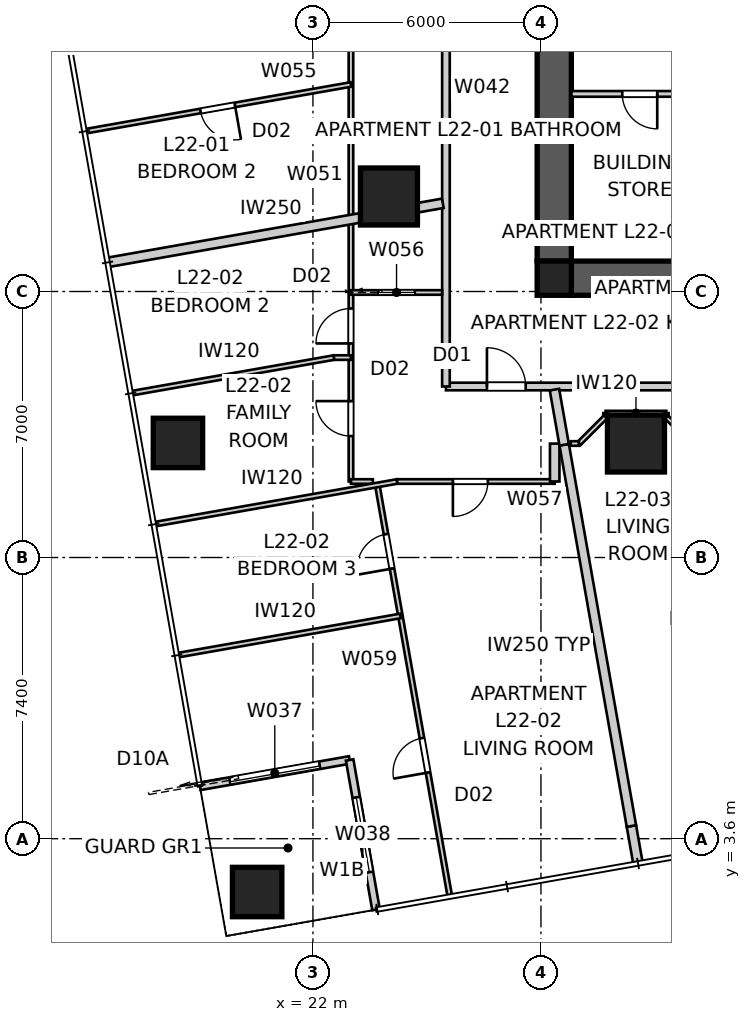
"""IFC4 building model, lengths in metres.
Left out: names, types, materials, properties, quantities, classifications, styles, units other than length and angle.
Written with IfcOpenShell. Run it as: python <this file> out.ifc"""

import sys

from ifc_helpers import new_model, si_unit, direction, frame, frame_2d, origin, origin_2d, place, context, subcontext, project, spatial, polyline, rectangle, outline, extrude, element, fill, save


model = new_model("IFC4")
c1 = context("Model", 3, precision=1e-05, world=origin(), true_north=direction((0.0, 1.0)))
c2 = subcontext(c1, "Body", "Model", "MODEL_VIEW")
j1 = project(units=[si_unit("LENGTHUNIT", "METRE"), si_unit("PLANEANGLEUNIT", "RADIAN")], contexts=[c1])
p1 = place(None, origin())
s1 = spatial("IfcSite", under=j1, at=p1, CompositionType="ELEMENT")
p2 = place(p1, origin())
s2 = spatial("IfcBuilding", under=s1, at=p2, CompositionType="ELEMENT")
p3 = place(p2, frame((0.0, 0.0, 82.8)))
s3 = spatial("IfcBuildingStorey", under=s2, at=p3, CompositionType="ELEMENT", Elevation=82.8)
p4 = place(p3, frame((51.2, 18.35, 0.0), z_axis=(0.0, 0.0, 1.0), x_axis=(-1.0, 0.0, 0.0)))
e1 = element("IfcWall", 1, at=p4, inside=s3, PredefinedType="SHEAR", context=c2, shape_type="SweptSolid", body=[
    extrude(outline(polyline([(0.0, -0.45), (22.4, -0.45), (22.4, -0.025), (22.85, -0.025), (22.85, 0.025), (22.4, 0.025), (22.4, 0.45), (0.0, 0.45), (0.0, 0.025), (-0.45, 0.025), (-0.45, -0.025), (0.0, -0.025), (0.0, -0.45)])), origin(), (0.0, 0.0, 1.0), 3.4),
])
p5 = place(p3, frame((28.35, 41.2, 0.0), z_axis=(0.0, 0.0, 1.0), x_axis=(0.0, -1.0, 0.0)))
e2 = element("IfcWall", 2, at=p5, inside=s3, PredefinedType="SHEAR", context=c2, shape_type="SweptSolid", body=[
    extrude(outline(polyline([(0.0, -0.45), (22.4, -0.45), (22.4, -0.025), (22.85, -0.025), (22.85, 0.025), (22.4, 0.025), (22.4, 0.45), (0.0, 0.45), (0.0, 0.025), (-0.45, 0.025), (-0.45, -0.025), (0.0, -0.025), (0.0, -0.45)])), origin(), (0.0, 0.0, 1.0), 3.4),
])
p6 = place(p5, frame((11.14, 0.0, 0.0)))
e3 = element("IfcOpeningElement", 3, at=p6, cuts=e2, PredefinedType="OPENING", context=c2, shape_type="SweptSolid", body=[
    extrude(rectangle(XDim=1.02, YDim=2.4, at=frame_2d((0.51, 1.2))), frame((0.0, 0.46, 0.0), z_axis=(0.0, -1.0, 0.0), x_axis=(1.0, 0.0, 0.0)), (0.0, 0.0, 1.0), 0.92),
])
p7 = place(p3, frame((28.35, 18.35, 0.0), z_axis=(0.0, 0.0, 1.0), x_axis=(1.0, 0.0, 0.0)))
e4 = element("IfcColumn", 4, at=p7, inside=s3, PredefinedType="COLUMN", context=c2, shape_type="SweptSolid", body=[
    extrude(rectangle(XDim=0.9, YDim=0.9, at=origin_2d()), origin(), (0.0, 0.0, 1.0), 3.4),
])
for number, where, z_axis, x_axis in (
    (5, (20.532, 2.197, 0.0), (0.0, 0.0, 1.0), (1.0, 0.0, 0.0)),
    (6, (18.448, 14.015, 0.0), (0.0, 0.0, 1.0), (1.0, 0.0, 0.0)),
):
    element("IfcColumn", number, at=place(p3, frame(where, z_axis=z_axis, x_axis=x_axis)), inside=s3, PredefinedType="COLUMN", context=c2, shape_type="SweptSolid", body=[
        extrude(rectangle(XDim=1.3, YDim=1.3, at=origin_2d()), origin(), (0.0, 0.0, 1.0), 3.4),
    ])
for number, where, z_axis, x_axis in (
    (7, (24.0, 20.5, 0.0), (0.0, 0.0, 1.0), (1.0, 0.0, 0.0)),
    (8, (30.5, 14.0, 0.0), (0.0, 0.0, 1.0), (1.0, 0.0, 0.0)),
):
    element("IfcColumn", number, at=place(p3, frame(where, z_axis=z_axis, x_axis=x_axis)), inside=s3, PredefinedType="COLUMN", context=c2, shape_type="SweptSolid", body=[
        extrude(rectangle(XDim=1.5, YDim=1.5, at=origin_2d()), origin(), (0.0, 0.0, 1.0), 3.4),
    ])
p8 = place(p3, frame((19.026, 4.978, 0.0), z_axis=(0.0, 0.0, 1.0), x_axis=(0.984808127031, 0.173646056486, 0.0)))
e9 = element("IfcWall", 9, at=p8, inside=s3, PredefinedType="SOLIDWALL", context=c2, shape_type="SweptSolid", body=[
    extrude(rectangle(XDim=4.0, YDim=0.2, at=frame_2d((2.0, 0.0))), origin(), (0.0, 0.0, 1.0), 3.25),
])
p9 = place(p8, frame((0.8, 0.0, 0.0)))
e10 = element("IfcOpeningElement", 10, at=p9, cuts=e9, PredefinedType="OPENING", context=c2, shape_type="SweptSolid", body=[
    extrude(rectangle(XDim=2.4, YDim=2.1, at=frame_2d((1.2, 1.05))), frame((0.0, 0.11, 0.0), z_axis=(0.0, -1.0, 0.0), x_axis=(1.0, 0.0, 0.0)), (0.0, 0.0, 1.0), 0.22),
])
p10 = place(p3, frame((22.966, 5.672, 0.0), z_axis=(0.0, 0.0, 1.0), x_axis=(0.173646056486, -0.984808127031, 0.0)))
e11 = element("IfcWall", 11, at=p10, inside=s3, PredefinedType="SOLIDWALL", context=c2, shape_type="SweptSolid", body=[
    extrude(rectangle(XDim=4.0, YDim=0.2, at=frame_2d((2.0, 0.0))), origin(), (0.0, 0.0, 1.0), 3.25),
])
p11 = place(p10, frame((1.0, 0.0, 0.45)))
e12 = element("IfcOpeningElement", 12, at=p11, cuts=e11, PredefinedType="OPENING", context=c2, shape_type="SweptSolid", body=[
    extrude(rectangle(XDim=2.0, YDim=1.8, at=frame_2d((1.0, 0.9))), frame((0.0, 0.11, 0.0), z_axis=(0.0, -1.0, 0.0), x_axis=(1.0, 0.0, 0.0)), (0.0, 0.0, 1.0), 0.22),
])
p12 = place(p3, frame((25.5, 15.5, 0.0), z_axis=(0.0, 0.0, 1.0), x_axis=(1.0, 0.0, 0.0)))
e13 = element("IfcWall", 13, at=p12, inside=s3, PredefinedType="PARTITIONING", context=c2, shape_type="SweptSolid", body=[
    extrude(rectangle(XDim=29.0, YDim=0.2, at=frame_2d((14.5, 0.0))), origin(), (0.0, 0.0, 1.0), 3.25),
])
p13 = place(p12, frame((15.794, 0.0, 0.0)))
e14 = element("IfcOpeningElement", 14, at=p13, cuts=e13, PredefinedType="OPENING", context=c2, shape_type="SweptSolid", body=[
    extrude(rectangle(XDim=1.02, YDim=2.34, at=frame_2d((0.51, 1.17))), frame((0.0, 0.11, 0.0), z_axis=(0.0, -1.0, 0.0), x_axis=(1.0, 0.0, 0.0)), (0.0, 0.0, 1.0), 0.22),
])
p14 = place(p12, frame((6.067, 0.0, 0.0)))
e15 = element("IfcOpeningElement", 15, at=p14, cuts=e13, PredefinedType="OPENING", context=c2, shape_type="SweptSolid", body=[
    extrude(rectangle(XDim=1.02, YDim=2.34, at=frame_2d((0.51, 1.17))), frame((0.0, 0.11, 0.0), z_axis=(0.0, -1.0, 0.0), x_axis=(1.0, 0.0, 0.0)), (0.0, 0.0, 1.0), 0.22),
])
p15 = place(p12, frame((1.079, 0.0, 0.0)))
e16 = element("IfcOpeningElement", 16, at=p15, cuts=e13, PredefinedType="OPENING", context=c2, shape_type="SweptSolid", body=[
    extrude(rectangle(XDim=1.02, YDim=2.34, at=frame_2d((0.51, 1.17))), frame((0.0, 0.11, 0.0), z_axis=(0.0, -1.0, 0.0), x_axis=(1.0, 0.0, 0.0)), (0.0, 0.0, 1.0), 0.22),
])
p16 = place(p3, frame((25.5, 44.5, 0.0), z_axis=(0.0, 0.0, 1.0), x_axis=(0.0, -1.0, 0.0)))
e17 = element("IfcWall", 17, at=p16, inside=s3, PredefinedType="PARTITIONING", context=c2, shape_type="SweptSolid", body=[
    extrude(rectangle(XDim=29.0, YDim=0.2, at=frame_2d((14.5, 0.0))), origin(), (0.0, 0.0, 1.0), 3.25),
])
p17 = place(p16, frame((12.263, 0.0, 0.0)))
e18 = element("IfcOpeningElement", 18, at=p17, cuts=e17, PredefinedType="OPENING", context=c2, shape_type="SweptSolid", body=[
    extrude(rectangle(XDim=1.02, YDim=2.34, at=frame_2d((0.51, 1.17))), frame((0.0, 0.11, 0.0), z_axis=(0.0, -1.0, 0.0), x_axis=(1.0, 0.0, 0.0)), (0.0, 0.0, 1.0), 0.22),
])
p18 = place(p16, frame((2.018, 0.0, 0.0)))
e19 = element("IfcOpeningElement", 19, at=p18, cuts=e17, PredefinedType="OPENING", context=c2, shape_type="SweptSolid", body=[
    extrude(rectangle(XDim=1.02, YDim=2.34, at=frame_2d((0.51, 1.17))), frame((0.0, 0.11, 0.0), z_axis=(0.0, -1.0, 0.0), x_axis=(1.0, 0.0, 0.0)), (0.0, 0.0, 1.0), 0.22),
])
p19 = place(p3, frame((16.595, 18.765, 0.0), z_axis=(0.0, 0.0, 1.0), x_axis=(0.984806596137, 0.173654738504, 0.0)))
e20 = element("IfcWall", 20, at=p19, inside=s3, PredefinedType="PARTITIONING", context=c2, shape_type="SweptSolid", body=[
    extrude(rectangle(XDim=8.958, YDim=0.25, at=frame_2d((4.479, 0.0))), origin(), (0.0, 0.0, 1.0), 3.25),
])
p20 = place(p3, frame((30.554, 2.949, 0.0), z_axis=(0.0, 0.0, 1.0), x_axis=(-0.173813186416, 0.984778643263, 0.0)))
e21 = element("IfcWall", 21, at=p20, inside=s3, PredefinedType="PARTITIONING", context=c2, shape_type="SweptSolid", body=[
    extrude(rectangle(XDim=1.0, YDim=0.25, at=frame_2d((0.5, 0.0))), origin(), (0.0, 0.0, 1.0), 3.25),
])
p21 = place(p3, frame((30.38, 3.934, 0.0), z_axis=(0.0, 0.0, 1.0), x_axis=(-0.173644522411, 0.984808397525, 0.0)))
e22 = element("IfcWall", 22, at=p21, inside=s3, PredefinedType="PARTITIONING", context=c2, shape_type="SweptSolid", body=[
    extrude(rectangle(XDim=10.188, YDim=0.25, at=frame_2d((5.094, 0.0))), origin(), (0.0, 0.0, 1.0), 2.638),
])
p22 = place(p3, frame((28.611, 13.967, 0.0), z_axis=(0.0, 0.0, 1.0), x_axis=(-0.173634105885, 0.984810234143, 0.0)))
e23 = element("IfcWall", 23, at=p22, inside=s3, PredefinedType="PARTITIONING", context=c2, shape_type="SweptSolid", body=[
    extrude(rectangle(XDim=1.474, YDim=0.25, at=frame_2d((0.737, 0.0))), origin(), (0.0, 0.0, 1.0), 3.25),
])
p23 = place(p3, frame((32.4, 23.2, 0.0), z_axis=(0.0, 0.0, 1.0), x_axis=(-1.0, 0.0, 0.0)))
e24 = element("IfcWall", 24, at=p23, inside=s3, PredefinedType="SOLIDWALL", context=c2, shape_type="SweptSolid", body=[
    extrude(rectangle(XDim=3.6, YDim=0.15, at=frame_2d((1.8, 0.0))), origin(), (0.0, 0.0, 1.0), 3.25),
])
p24 = place(p23, frame((1.34, 0.0, 0.0)))
e25 = element("IfcOpeningElement", 25, at=p24, cuts=e24, PredefinedType="OPENING", context=c2, shape_type="SweptSolid", body=[
    extrude(rectangle(XDim=0.92, YDim=2.1, at=frame_2d((0.46, 1.05))), frame((0.0, 0.085, 0.0), z_axis=(0.0, -1.0, 0.0), x_axis=(1.0, 0.0, 0.0)), (0.0, 0.0, 1.0), 0.17),
])
p25 = place(p3, frame((23.0, 13.0, 0.0), z_axis=(0.0, 0.0, 1.0), x_axis=(0.0, 1.0, 0.0)))
e26 = element("IfcWall", 26, at=p25, inside=s3, PredefinedType="PARTITIONING", context=c2, shape_type="SweptSolid", body=[
    extrude(rectangle(XDim=34.0, YDim=0.12, at=frame_2d((17.0, 0.0))), origin(), (0.0, 0.0, 1.0), 2.55),
])
p26 = place(p25, frame((18.848, 0.0, 0.0)))
e27 = element("IfcOpeningElement", 27, at=p26, cuts=e26, PredefinedType="OPENING", context=c2, shape_type="SweptSolid", body=[
    extrude(rectangle(XDim=0.92, YDim=2.34, at=frame_2d((0.46, 1.17))), frame((0.0, 0.07, 0.0), z_axis=(0.0, -1.0, 0.0), x_axis=(1.0, 0.0, 0.0)), (0.0, 0.0, 1.0), 0.14),
])
p27 = place(p25, frame((16.284, 0.0, 0.0)))
e28 = element("IfcOpeningElement", 28, at=p27, cuts=e26, PredefinedType="OPENING", context=c2, shape_type="SweptSolid", body=[
    extrude(rectangle(XDim=0.92, YDim=2.34, at=frame_2d((0.46, 1.17))), frame((0.0, 0.07, 0.0), z_axis=(0.0, -1.0, 0.0), x_axis=(1.0, 0.0, 0.0)), (0.0, 0.0, 1.0), 0.14),
])
p28 = place(p25, frame((29.052, 0.0, 0.0)))
e29 = element("IfcOpeningElement", 29, at=p28, cuts=e26, PredefinedType="OPENING", context=c2, shape_type="SweptSolid", body=[
    extrude(rectangle(XDim=0.92, YDim=2.34, at=frame_2d((0.46, 1.17))), frame((0.0, 0.07, 0.0), z_axis=(0.0, -1.0, 0.0), x_axis=(1.0, 0.0, 0.0)), (0.0, 0.0, 1.0), 0.14),
])
p29 = place(p25, frame((1.196, 0.0, 0.0)))
e30 = element("IfcOpeningElement", 30, at=p29, cuts=e26, PredefinedType="OPENING", context=c2, shape_type="SweptSolid", body=[
    extrude(rectangle(XDim=0.92, YDim=2.34, at=frame_2d((0.46, 1.17))), frame((0.0, 0.07, 0.0), z_axis=(0.0, -1.0, 0.0), x_axis=(1.0, 0.0, 0.0)), (0.0, 0.0, 1.0), 0.14),
])
p30 = place(p25, frame((3.633, 0.0, 0.0)))
e31 = element("IfcOpeningElement", 31, at=p30, cuts=e26, PredefinedType="OPENING", context=c2, shape_type="SweptSolid", body=[
    extrude(rectangle(XDim=0.92, YDim=2.34, at=frame_2d((0.46, 1.17))), frame((0.0, 0.07, 0.0), z_axis=(0.0, -1.0, 0.0), x_axis=(1.0, 0.0, 0.0)), (0.0, 0.0, 1.0), 0.14),
])
p31 = place(p25, frame((23.619, 0.0, 0.0)))
e32 = element("IfcOpeningElement", 32, at=p31, cuts=e26, PredefinedType="OPENING", context=c2, shape_type="SweptSolid", body=[
    extrude(rectangle(XDim=0.96, YDim=2.1, at=frame_2d((0.48, 1.05))), frame((0.0, 0.07, 0.0), z_axis=(0.0, -1.0, 0.0), x_axis=(1.0, 0.0, 0.0)), (0.0, 0.0, 1.0), 0.14),
])
p32 = place(p3, frame((23.0, 23.448, 0.0), z_axis=(0.0, 0.0, 1.0), x_axis=(-0.984809234282, -0.173639776761, 0.0)))
e33 = element("IfcWall", 33, at=p32, inside=s3, PredefinedType="PARTITIONING", context=c2, shape_type="SweptSolid", body=[
    extrude(rectangle(XDim=7.081, YDim=0.12, at=frame_2d((3.541, 0.0))), origin(), (0.0, 0.0, 1.0), 3.25),
])
p33 = place(p32, frame((3.1, 0.0, 0.0)))
e34 = element("IfcOpeningElement", 34, at=p33, cuts=e33, PredefinedType="OPENING", context=c2, shape_type="SweptSolid", body=[
    extrude(rectangle(XDim=0.92, YDim=2.34, at=frame_2d((0.46, 1.17))), frame((0.0, 0.07, 0.0), z_axis=(0.0, -1.0, 0.0), x_axis=(1.0, 0.0, 0.0)), (0.0, 0.0, 1.0), 0.14),
])
p34 = place(p3, frame((23.0, 17.975, 0.0), z_axis=(0.0, 0.0, 1.0), x_axis=(1.0, 0.0, 0.0)))
e35 = element("IfcWall", 35, at=p34, inside=s3, PredefinedType="PARTITIONING", context=c2, shape_type="SweptSolid", body=[
    extrude(rectangle(XDim=2.4, YDim=0.12, at=frame_2d((1.2, 0.0))), origin(), (0.0, 0.0, 1.0), 3.25),
])
p35 = place(p34, frame((0.72, 0.0, 0.0)))
e36 = element("IfcOpeningElement", 36, at=p35, cuts=e35, PredefinedType="OPENING", context=c2, shape_type="SweptSolid", body=[
    extrude(rectangle(XDim=0.96, YDim=2.1, at=frame_2d((0.48, 1.05))), frame((0.0, 0.07, 0.0), z_axis=(0.0, -1.0, 0.0), x_axis=(1.0, 0.0, 0.0)), (0.0, 0.0, 1.0), 0.14),
])
p36 = place(p3, frame((28.362, 13.0, 0.0), z_axis=(0.0, 0.0, 1.0), x_axis=(-1.0, 0.0, 0.0)))
e37 = element("IfcWall", 37, at=p36, inside=s3, PredefinedType="PARTITIONING", context=c2, shape_type="SweptSolid", body=[
    extrude(rectangle(XDim=4.151, YDim=0.12, at=frame_2d((2.076, 0.0))), origin(), (0.0, 0.0, 1.0), 2.638),
])
p37 = place(p36, frame((1.76, 0.0, 0.0)))
e38 = element("IfcOpeningElement", 38, at=p37, cuts=e37, PredefinedType="OPENING", context=c2, shape_type="SweptSolid", body=[
    extrude(rectangle(XDim=0.92, YDim=2.34, at=frame_2d((0.46, 1.17))), frame((0.0, 0.07, 0.0), z_axis=(0.0, -1.0, 0.0), x_axis=(1.0, 0.0, 0.0)), (0.0, 0.0, 1.0), 0.14),
])
p38 = place(p3, frame((28.362, 13.998, 0.0), z_axis=(0.0, 0.0, 1.0), x_axis=(0.0, -1.0, 0.0)))
e39 = element("IfcWall", 39, at=p38, inside=s3, PredefinedType="PARTITIONING", context=c2, shape_type="SweptSolid", body=[
    extrude(rectangle(XDim=0.998, YDim=0.25, at=frame_2d((0.499, 0.0))), origin(), (0.0, 0.0, 1.0), 3.25),
])
p39 = place(p3, frame((25.597, 2.115, 0.0), z_axis=(0.0, 0.0, 1.0), x_axis=(-0.173639194339, 0.984809336973, 0.0)))
e40 = element("IfcWall", 40, at=p39, inside=s3, PredefinedType="PARTITIONING", context=c2, shape_type="SweptSolid", body=[
    extrude(rectangle(XDim=10.96, YDim=0.12, at=frame_2d((5.48, 0.0))), origin(), (0.0, 0.0, 1.0), 3.25),
])
p40 = place(p39, frame((3.275, 0.0, 0.0)))
e41 = element("IfcOpeningElement", 41, at=p40, cuts=e40, PredefinedType="OPENING", context=c2, shape_type="SweptSolid", body=[
    extrude(rectangle(XDim=0.92, YDim=2.34, at=frame_2d((0.46, 1.17))), frame((0.0, 0.07, 0.0), z_axis=(0.0, -1.0, 0.0), x_axis=(1.0, 0.0, 0.0)), (0.0, 0.0, 1.0), 0.14),
])
p41 = place(p39, frame((8.725, 0.0, 0.0)))
e42 = element("IfcOpeningElement", 42, at=p41, cuts=e40, PredefinedType="OPENING", context=c2, shape_type="SweptSolid", body=[
    extrude(rectangle(XDim=0.92, YDim=2.34, at=frame_2d((0.46, 1.17))), frame((0.0, 0.07, 0.0), z_axis=(0.0, -1.0, 0.0), x_axis=(1.0, 0.0, 0.0)), (0.0, 0.0, 1.0), 0.14),
])
p42 = place(p3, frame((17.85, 11.878, 0.0), z_axis=(0.0, 0.0, 1.0), x_axis=(0.984806762864, 0.173653792983, 0.0)))
e43 = element("IfcWall", 43, at=p42, inside=s3, PredefinedType="PARTITIONING", context=c2, shape_type="SweptSolid", body=[
    extrude(rectangle(XDim=6.459, YDim=0.12, at=frame_2d((3.229, 0.0))), origin(), (0.0, 0.0, 1.0), 2.638),
])
p43 = place(p3, frame((18.458, 8.432, 0.0), z_axis=(0.0, 0.0, 1.0), x_axis=(0.98480923034, 0.173639799116, 0.0)))
e44 = element("IfcWall", 44, at=p43, inside=s3, PredefinedType="PARTITIONING", context=c2, shape_type="SweptSolid", body=[
    extrude(rectangle(XDim=5.933, YDim=0.12, at=frame_2d((2.967, 0.0))), origin(), (0.0, 0.0, 1.0), 3.25),
])
p44 = place(p3, frame((23.0, 16.261, 0.0), z_axis=(0.0, 0.0, 1.0), x_axis=(-1.0, 0.0, 0.0)))
e45 = element("IfcWall", 45, at=p44, inside=s3, PredefinedType="PARTITIONING", context=c2, shape_type="SweptSolid", body=[
    extrude(rectangle(XDim=0.45, YDim=0.12, at=frame_2d((0.225, 0.0))), origin(), (0.0, 0.0, 1.0), 3.25),
])
p45 = place(p3, frame((22.55, 16.261, 0.0), z_axis=(0.0, 0.0, 1.0), x_axis=(-0.984810453076, -0.173632864151, 0.0)))
e46 = element("IfcWall", 46, at=p45, inside=s3, PredefinedType="PARTITIONING", context=c2, shape_type="SweptSolid", body=[
    extrude(rectangle(XDim=5.389, YDim=0.12, at=frame_2d((2.695, 0.0))), origin(), (0.0, 0.0, 1.0), 3.25),
])
p46 = place(p3, frame((32.0, 14.0, 0.0), z_axis=(0.0, 0.0, 1.0), x_axis=(-0.707106781187, 0.707106781187, 0.0)))
e47 = element("IfcWall", 47, at=p46, inside=s3, PredefinedType="PARTITIONING", context=c2, shape_type="SweptSolid", body=[
    extrude(rectangle(XDim=0.99, YDim=0.12, at=frame_2d((0.495, 0.0))), origin(), (0.0, 0.0, 1.0), 3.25),
])
p47 = place(p3, frame((31.3, 14.8, 0.0), z_axis=(0.0, 0.0, 1.0), x_axis=(-1.0, 0.0, 0.0)))
e48 = element("IfcWall", 48, at=p47, inside=s3, PredefinedType="PARTITIONING", context=c2, shape_type="SweptSolid", body=[
    extrude(rectangle(XDim=1.6, YDim=0.12, at=frame_2d((0.8, 0.0))), origin(), (0.0, 0.0, 1.0), 3.25),
])
p48 = place(p3, frame((29.7, 14.7, 0.0), z_axis=(0.0, 0.0, 1.0), x_axis=(-0.707106781187, -0.707106781187, 0.0)))
e49 = element("IfcWall", 49, at=p48, inside=s3, PredefinedType="PARTITIONING", context=c2, shape_type="SweptSolid", body=[
    extrude(rectangle(XDim=0.99, YDim=0.12, at=frame_2d((0.495, 0.0))), origin(), (0.0, 0.0, 1.0), 3.25),
])
p49 = place(p3, frame((29.0, 14.0, 0.0), z_axis=(0.0, 0.0, 1.0), x_axis=(-1.0, 0.0, 0.0)))
e50 = element("IfcWall", 50, at=p49, inside=s3, PredefinedType="PARTITIONING", context=c2, shape_type="SweptSolid", body=[
    extrude(rectangle(XDim=0.219, YDim=0.12, at=frame_2d((0.109, 0.0))), origin(), (0.0, 0.0, 1.0), 3.25),
])
p50 = place(p3, frame((23.0, 13.0, 0.0), z_axis=(0.0, 0.0, 1.0), x_axis=(1.0, 0.0, 0.0)))
e51 = element("IfcWall", 51, at=p50, inside=s3, PredefinedType="PARTITIONING", context=c2, shape_type="SweptSolid", body=[
    extrude(rectangle(XDim=0.578, YDim=0.12, at=frame_2d((0.289, 0.0))), origin(), (0.0, 0.0, 1.0), 3.25),
])
for number, where, z_axis, x_axis in (
    (52, (31.3, 14.8, 0.0), (0.0, 0.0, 1.0), (0.0, -1.0, 0.0)),
    (53, (29.7, 14.8, 0.0), (0.0, 0.0, 1.0), (0.0, -1.0, 0.0)),
):
    element("IfcWall", number, at=place(p3, frame(where, z_axis=z_axis, x_axis=x_axis)), inside=s3, PredefinedType="PARTITIONING", context=c2, shape_type="SweptSolid", body=[
        extrude(rectangle(XDim=0.1, YDim=0.12, at=frame_2d((0.05, 0.0))), origin(), (0.0, 0.0, 1.0), 3.25),
    ])
p51 = place(p9, origin())
e54 = element("IfcDoor", 54, at=p51, inside=s3, OperationType="SLIDING_TO_LEFT", PredefinedType="DOOR", context=c2, shape_type="SweptSolid", body=[
    extrude(rectangle(XDim=2.4, YDim=2.1, at=frame_2d((1.2, 1.05))), frame((0.0, 0.025, 0.0), z_axis=(0.0, -1.0, 0.0), x_axis=(1.0, 0.0, 0.0)), (0.0, 0.0, 1.0), 0.05),
])
fill(e10, e54)
p52 = place(p11, origin())
e55 = element("IfcWindow", 55, at=p52, inside=s3, PartitioningType="SINGLE_PANEL", PredefinedType="WINDOW", context=c2, shape_type="SweptSolid", body=[
    extrude(rectangle(XDim=2.0, YDim=1.8, at=frame_2d((1.0, 0.9))), frame((0.0, 0.03, 0.0), z_axis=(0.0, -1.0, 0.0), x_axis=(1.0, 0.0, 0.0)), (0.0, 0.0, 1.0), 0.06),
])
fill(e12, e55)
p53 = place(p15, origin())
e56 = element("IfcDoor", 56, at=p53, inside=s3, OperationType="SINGLE_SWING_LEFT", PredefinedType="DOOR", context=c2, shape_type="SweptSolid", body=[
    extrude(rectangle(XDim=1.02, YDim=2.34, at=frame_2d((0.51, 1.17))), frame((0.0, 0.025, 0.0), z_axis=(0.0, -1.0, 0.0), x_axis=(1.0, 0.0, 0.0)), (0.0, 0.0, 1.0), 0.05),
])
fill(e16, e56)
p54 = place(p24, origin())
e57 = element("IfcDoor", 57, at=p54, inside=s3, OperationType="SINGLE_SWING_LEFT", PredefinedType="DOOR", context=c2, shape_type="SweptSolid", body=[
    extrude(rectangle(XDim=0.92, YDim=2.1, at=frame_2d((0.46, 1.05))), frame((0.0, 0.025, 0.0), z_axis=(0.0, -1.0, 0.0), x_axis=(1.0, 0.0, 0.0)), (0.0, 0.0, 1.0), 0.05),
])
fill(e25, e57)
p55 = place(p37, origin())
e58 = element("IfcDoor", 58, at=p55, inside=s3, OperationType="SINGLE_SWING_RIGHT", PredefinedType="DOOR", context=c2, shape_type="SweptSolid", body=[
    extrude(rectangle(XDim=0.92, YDim=2.34, at=frame_2d((0.46, 1.17))), frame((0.0, 0.025, 0.0), z_axis=(0.0, -1.0, 0.0), x_axis=(1.0, 0.0, 0.0)), (0.0, 0.0, 1.0), 0.05),
])
fill(e38, e58)
p56 = place(p29, origin())
e59 = element("IfcDoor", 59, at=p56, inside=s3, OperationType="SINGLE_SWING_RIGHT", PredefinedType="DOOR", context=c2, shape_type="SweptSolid", body=[
    extrude(rectangle(XDim=0.92, YDim=2.34, at=frame_2d((0.46, 1.17))), frame((0.0, 0.025, 0.0), z_axis=(0.0, -1.0, 0.0), x_axis=(1.0, 0.0, 0.0)), (0.0, 0.0, 1.0), 0.05),
])
fill(e30, e59)
p57 = place(p35, origin())
e60 = element("IfcDoor", 60, at=p57, inside=s3, OperationType="SLIDING_TO_LEFT", PredefinedType="DOOR", context=c2, shape_type="SweptSolid", body=[
    extrude(rectangle(XDim=0.96, YDim=2.1, at=frame_2d((0.48, 1.05))), frame((0.0, 0.025, 0.0), z_axis=(0.0, -1.0, 0.0), x_axis=(1.0, 0.0, 0.0)), (0.0, 0.0, 1.0), 0.05),
])
fill(e36, e60)
p58 = place(p30, origin())
e61 = element("IfcDoor", 61, at=p58, inside=s3, OperationType="SINGLE_SWING_LEFT", PredefinedType="DOOR", context=c2, shape_type="SweptSolid", body=[
    extrude(rectangle(XDim=0.92, YDim=2.34, at=frame_2d((0.46, 1.17))), frame((0.0, 0.025, 0.0), z_axis=(0.0, -1.0, 0.0), x_axis=(1.0, 0.0, 0.0)), (0.0, 0.0, 1.0), 0.05),
])
fill(e31, e61)
p59 = place(p33, origin())
e62 = element("IfcDoor", 62, at=p59, inside=s3, OperationType="SINGLE_SWING_LEFT", PredefinedType="DOOR", context=c2, shape_type="SweptSolid", body=[
    extrude(rectangle(XDim=0.92, YDim=2.34, at=frame_2d((0.46, 1.17))), frame((0.0, 0.025, 0.0), z_axis=(0.0, -1.0, 0.0), x_axis=(1.0, 0.0, 0.0)), (0.0, 0.0, 1.0), 0.05),
])
fill(e34, e62)
p60 = place(p40, origin())
e63 = element("IfcDoor", 63, at=p60, inside=s3, OperationType="SINGLE_SWING_LEFT", PredefinedType="DOOR", context=c2, shape_type="SweptSolid", body=[
    extrude(rectangle(XDim=0.92, YDim=2.34, at=frame_2d((0.46, 1.17))), frame((0.0, 0.025, 0.0), z_axis=(0.0, -1.0, 0.0), x_axis=(1.0, 0.0, 0.0)), (0.0, 0.0, 1.0), 0.05),
])
fill(e41, e63)
p61 = place(p41, origin())
e64 = element("IfcDoor", 64, at=p61, inside=s3, OperationType="SINGLE_SWING_LEFT", PredefinedType="DOOR", context=c2, shape_type="SweptSolid", body=[
    extrude(rectangle(XDim=0.92, YDim=2.34, at=frame_2d((0.46, 1.17))), frame((0.0, 0.025, 0.0), z_axis=(0.0, -1.0, 0.0), x_axis=(1.0, 0.0, 0.0)), (0.0, 0.0, 1.0), 0.05),
])
fill(e42, e64)
save(model, sys.argv[1])
